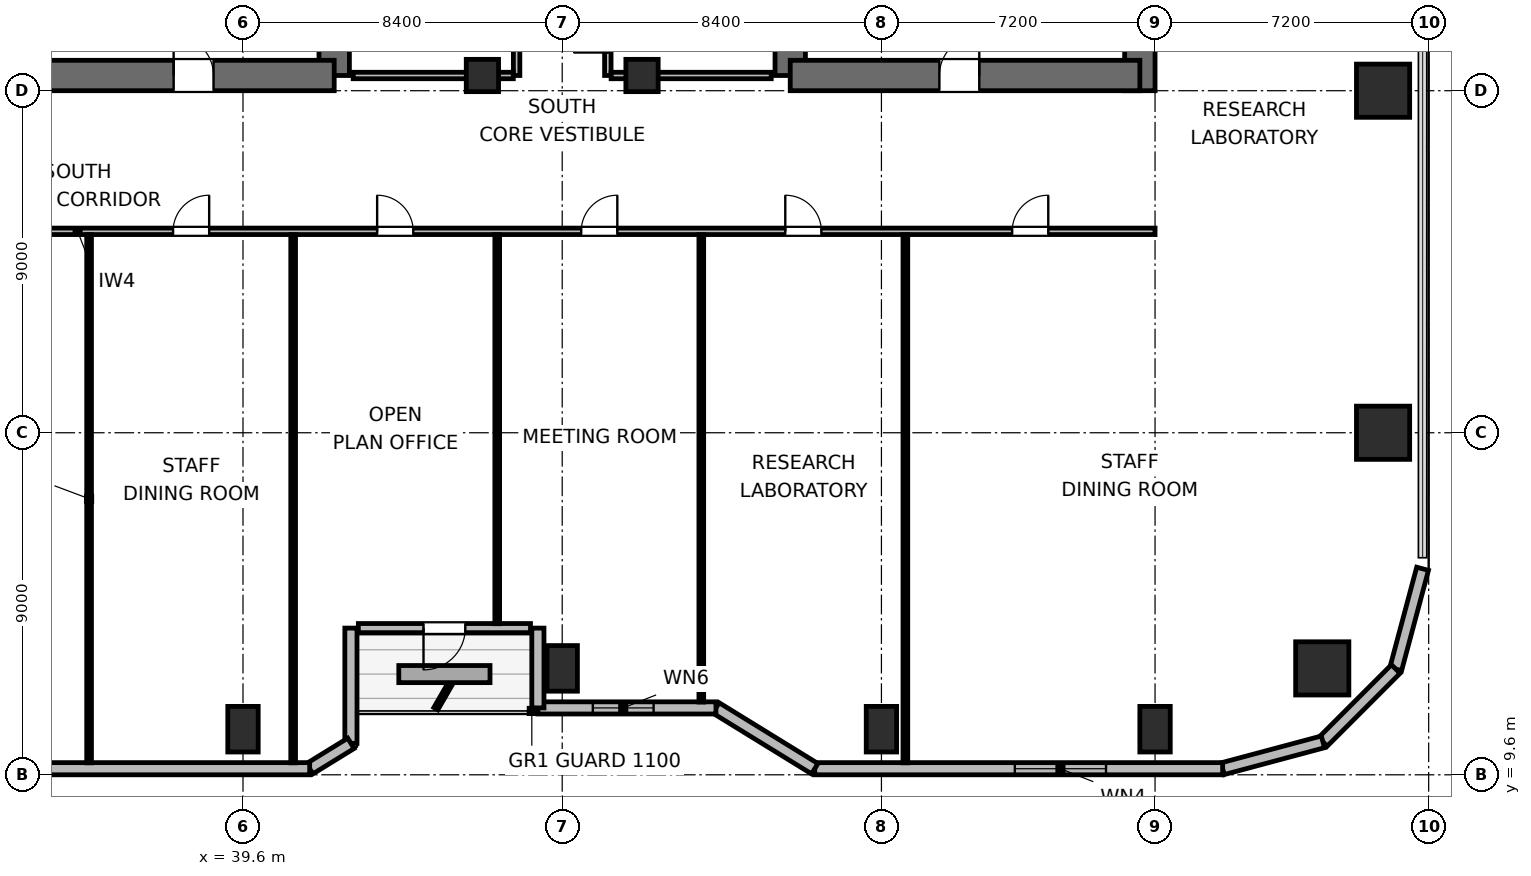
"""IFC4 building model, lengths in metres.
Left out: names, types, materials, properties, quantities, classifications, styles, units other than length and angle.
Written with IfcOpenShell. Run it as: python <this file> out.ifc"""

import sys

from ifc_helpers import new_model, si_unit, direction, frame, frame_2d, origin, origin_2d, place, context, subcontext, project, spatial, rectangle, circle, extrude, element, fill, save


model = new_model("IFC4")
c1 = context("Model", 3, precision=1e-05, world=origin(), true_north=direction((0.0, 1.0)))
c2 = subcontext(c1, "Body", "Model", "MODEL_VIEW")
j1 = project(units=[si_unit("LENGTHUNIT", "METRE"), si_unit("PLANEANGLEUNIT", "RADIAN")], contexts=[c1])
p1 = place(None, origin())
s1 = spatial("IfcSite", under=j1, at=p1, CompositionType="ELEMENT")
p2 = place(p1, origin())
s2 = spatial("IfcBuilding", under=s1, at=p2, CompositionType="ELEMENT")
p3 = place(p2, frame((0.0, 0.0, 125.4)))
s3 = spatial("IfcBuildingStorey", under=s2, at=p3, CompositionType="ELEMENT", Elevation=125.4)
p4 = place(p3, frame((42.0, 28.0, 0.0), z_axis=(0.0, 0.0, 1.0), x_axis=(0.0, 1.0, 0.0)))
e1 = element("IfcWall", 1, at=p4, inside=s3, PredefinedType="SHEAR", context=c2, shape_type="SweptSolid", body=[
    extrude(rectangle(XDim=6.4, YDim=0.8, at=frame_2d((3.2, 0.0))), origin(), (0.0, 0.0, 1.0), 4.5),
])
p5 = place(p3, frame((32.8, 28.0, 0.0), z_axis=(0.0, 0.0, 1.0), x_axis=(1.0, 0.0, 0.0)))
e2 = element("IfcWall", 2, at=p5, inside=s3, PredefinedType="SHEAR", context=c2, shape_type="SweptSolid", body=[
    extrude(rectangle(XDim=9.2, YDim=0.8, at=frame_2d((4.6, 0.0))), origin(), (0.0, 0.0, 1.0), 4.5),
])
p6 = place(p5, frame((4.975, 0.0, 0.0)))
e3 = element("IfcOpeningElement", 3, at=p6, cuts=e2, PredefinedType="OPENING", context=c2, shape_type="SweptSolid", body=[
    extrude(rectangle(XDim=1.05, YDim=2.04, at=frame_2d((0.525, 1.02))), frame((0.0, 0.41, 0.0), z_axis=(0.0, -1.0, 0.0), x_axis=(1.0, 0.0, 0.0)), (0.0, 0.0, 1.0), 0.82),
])
p7 = place(p3, frame((54.0, 28.0, 0.0), z_axis=(0.0, 0.0, 1.0), x_axis=(0.0, 1.0, 0.0)))
e4 = element("IfcWall", 4, at=p7, inside=s3, PredefinedType="SHEAR", context=c2, shape_type="SweptSolid", body=[
    extrude(rectangle(XDim=7.8, YDim=0.8, at=frame_2d((3.9, 0.0))), origin(), (0.0, 0.0, 1.0), 4.5),
])
p8 = place(p3, frame((63.2, 27.6, 0.0), z_axis=(0.0, 0.0, 1.0), x_axis=(0.0, 1.0, 0.0)))
e5 = element("IfcWall", 5, at=p8, inside=s3, PredefinedType="SHEAR", context=c2, shape_type="SweptSolid", body=[
    extrude(rectangle(XDim=16.8, YDim=0.8, at=frame_2d((8.4, 0.0))), origin(), (0.0, 0.0, 1.0), 4.5),
])
p9 = place(p3, frame((54.0, 28.0, 0.0), z_axis=(0.0, 0.0, 1.0), x_axis=(1.0, 0.0, 0.0)))
e6 = element("IfcWall", 6, at=p9, inside=s3, PredefinedType="SHEAR", context=c2, shape_type="SweptSolid", body=[
    extrude(rectangle(XDim=9.2, YDim=0.8, at=frame_2d((4.6, 0.0))), origin(), (0.0, 0.0, 1.0), 4.5),
])
p10 = place(p9, frame((3.925, 0.0, 0.0)))
e7 = element("IfcOpeningElement", 7, at=p10, cuts=e6, PredefinedType="OPENING", context=c2, shape_type="SweptSolid", body=[
    extrude(rectangle(XDim=1.05, YDim=2.04, at=frame_2d((0.525, 1.02))), frame((0.0, 0.41, 0.0), z_axis=(0.0, -1.0, 0.0), x_axis=(1.0, 0.0, 0.0)), (0.0, 0.0, 1.0), 0.82),
])
p11 = place(p3, frame((68.0, 12.4, 0.0), z_axis=(0.0, 0.0, 1.0), x_axis=(1.0, 0.0, 0.0)))
e8 = element("IfcColumn", 8, at=p11, inside=s3, PredefinedType="COLUMN", context=c2, shape_type="SweptSolid", body=[
    extrude(circle(Radius=0.7, at=origin_2d()), origin(), (0.0, 0.0, 1.0), 4.5),
])
for number, where, z_axis, x_axis in (
    (9, (39.6, 10.8, 0.0), (0.0, 0.0, 1.0), (1.0, 0.0, 0.0)),
    (10, (48.0, 12.4, 0.0), (0.0, 0.0, 1.0), (1.0, 0.0, 0.0)),
    (11, (56.4, 10.8, 0.0), (0.0, 0.0, 1.0), (1.0, 0.0, 0.0)),
    (12, (63.6, 10.8, 0.0), (0.0, 0.0, 1.0), (1.0, 0.0, 0.0)),
):
    element("IfcColumn", number, at=place(p3, frame(where, z_axis=z_axis, x_axis=x_axis)), inside=s3, PredefinedType="COLUMN", context=c2, shape_type="SweptSolid", body=[
        extrude(rectangle(XDim=0.8, YDim=1.2, at=origin_2d()), origin(), (0.0, 0.0, 1.0), 4.5),
    ])
for number, where, z_axis, x_axis in (
    (13, (69.6, 18.6, 0.0), (0.0, 0.0, 1.0), (1.0, 0.0, 0.0)),
    (14, (69.6, 27.6, 0.0), (0.0, 0.0, 1.0), (1.0, 0.0, 0.0)),
):
    element("IfcColumn", number, at=place(p3, frame(where, z_axis=z_axis, x_axis=x_axis)), inside=s3, PredefinedType="COLUMN", context=c2, shape_type="SweptSolid", body=[
        extrude(rectangle(XDim=1.4, YDim=1.4, at=origin_2d()), origin(), (0.0, 0.0, 1.0), 4.5),
    ])
for number, where, z_axis, x_axis in (
    (15, (45.9, 28.0, 0.0), (0.0, 0.0, 1.0), (1.0, 0.0, 0.0)),
    (16, (50.1, 28.0, 0.0), (0.0, 0.0, 1.0), (1.0, 0.0, 0.0)),
):
    element("IfcColumn", number, at=place(p3, frame(where, z_axis=z_axis, x_axis=x_axis)), inside=s3, PredefinedType="COLUMN", context=c2, shape_type="SweptSolid", body=[
        extrude(rectangle(XDim=0.85, YDim=0.85, at=origin_2d()), origin(), (0.0, 0.0, 1.0), 4.5),
    ])
p12 = place(p3, frame((70.64, 15.021, 0.0), z_axis=(0.0, 0.0, 1.0), x_axis=(-0.258613949072, -0.965980758269, 0.0)))
e17 = element("IfcWall", 17, at=p12, inside=s3, PredefinedType="SOLIDWALL", context=c2, shape_type="SweptSolid", body=[
    extrude(rectangle(XDim=2.731, YDim=0.32, at=frame_2d((1.366, 0.0))), origin(), (0.0, 0.0, 1.0), 4.24),
])
p13 = place(p3, frame((69.934, 12.383, 0.0), z_axis=(0.0, 0.0, 1.0), x_axis=(-0.707151821269, -0.707061738235, 0.0)))
e18 = element("IfcWall", 18, at=p13, inside=s3, PredefinedType="SOLIDWALL", context=c2, shape_type="SweptSolid", body=[
    extrude(rectangle(XDim=2.71, YDim=0.32, at=frame_2d((1.355, 0.0))), origin(), (0.0, 0.0, 1.0), 4.24),
])
p14 = place(p3, frame((68.017, 10.467, 0.0), z_axis=(0.0, 0.0, 1.0), x_axis=(-0.965958423373, -0.25869736047, 0.0)))
e19 = element("IfcWall", 19, at=p14, inside=s3, PredefinedType="SOLIDWALL", context=c2, shape_type="SweptSolid", body=[
    extrude(rectangle(XDim=2.731, YDim=0.32, at=frame_2d((1.366, 0.0))), origin(), (0.0, 0.0, 1.0), 4.24),
])
p15 = place(p3, frame((65.379, 9.76, 0.0), z_axis=(0.0, 0.0, 1.0), x_axis=(-1.0, 0.0, 0.0)))
e20 = element("IfcWall", 20, at=p15, inside=s3, PredefinedType="SOLIDWALL", context=c2, shape_type="SweptSolid", body=[
    extrude(rectangle(XDim=10.734, YDim=0.32, at=frame_2d((5.367, 0.0))), origin(), (0.0, 0.0, 1.0), 4.24),
])
p16 = place(p15, frame((3.069, 0.0, 0.85)))
e21 = element("IfcOpeningElement", 21, at=p16, cuts=e20, PredefinedType="OPENING", context=c2, shape_type="SweptSolid", body=[
    extrude(rectangle(XDim=2.4, YDim=1.15, at=frame_2d((1.2, 0.575))), frame((0.0, 0.17, 0.0), z_axis=(0.0, -1.0, 0.0), x_axis=(1.0, 0.0, 0.0)), (0.0, 0.0, 1.0), 0.34),
])
p17 = place(p3, frame((54.645, 9.76, 0.0), z_axis=(0.0, 0.0, 1.0), x_axis=(-0.851630857047, 0.524142044989, 0.0)))
e22 = element("IfcWall", 22, at=p17, inside=s3, PredefinedType="SOLIDWALL", context=c2, shape_type="SweptSolid", body=[
    extrude(rectangle(XDim=3.053, YDim=0.32, at=frame_2d((1.526, 0.0))), origin(), (0.0, 0.0, 1.0), 3.475),
])
p18 = place(p3, frame((52.045, 11.36, 0.0), z_axis=(0.0, 0.0, 1.0), x_axis=(-1.0, 0.0, 0.0)))
e23 = element("IfcWall", 23, at=p18, inside=s3, PredefinedType="SOLIDWALL", context=c2, shape_type="SweptSolid", body=[
    extrude(rectangle(XDim=4.685, YDim=0.32, at=frame_2d((2.343, 0.0))), origin(), (0.0, 0.0, 1.0), 3.475),
])
p19 = place(p18, frame((1.64, 0.0, 0.85)))
e24 = element("IfcOpeningElement", 24, at=p19, cuts=e23, PredefinedType="OPENING", context=c2, shape_type="SweptSolid", body=[
    extrude(rectangle(XDim=1.6, YDim=1.0, at=frame_2d((0.8, 0.5))), frame((0.0, 0.17, 0.0), z_axis=(0.0, -1.0, 0.0), x_axis=(1.0, 0.0, 0.0)), (0.0, 0.0, 1.0), 0.34),
])
p20 = place(p3, frame((47.36, 11.36, 0.0), z_axis=(0.0, 0.0, 1.0), x_axis=(0.0, 1.0, 0.0)))
e25 = element("IfcWall", 25, at=p20, inside=s3, PredefinedType="SOLIDWALL", context=c2, shape_type="SweptSolid", body=[
    extrude(rectangle(XDim=2.1, YDim=0.32, at=frame_2d((1.05, 0.0))), origin(), (0.0, 0.0, 1.0), 3.475),
])
p21 = place(p3, frame((47.165, 13.46, 0.0), z_axis=(0.0, 0.0, 1.0), x_axis=(-1.0, 0.0, 0.0)))
e26 = element("IfcWall", 26, at=p21, inside=s3, PredefinedType="SOLIDWALL", context=c2, shape_type="SweptSolid", body=[
    extrude(rectangle(XDim=4.53, YDim=0.24, at=frame_2d((2.265, 0.0))), origin(), (0.0, 0.0, 1.0), 4.24),
])
p22 = place(p21, frame((1.715, 0.0, 0.0)))
e27 = element("IfcOpeningElement", 27, at=p22, cuts=e26, PredefinedType="OPENING", context=c2, shape_type="SweptSolid", body=[
    extrude(rectangle(XDim=1.1, YDim=2.04, at=frame_2d((0.55, 1.02))), frame((0.0, 0.13, 0.0), z_axis=(0.0, -1.0, 0.0), x_axis=(1.0, 0.0, 0.0)), (0.0, 0.0, 1.0), 0.26),
])
p23 = place(p3, frame((42.44, 13.46, 0.0), z_axis=(0.0, 0.0, 1.0), x_axis=(0.0, -1.0, 0.0)))
e28 = element("IfcWall", 28, at=p23, inside=s3, PredefinedType="SOLIDWALL", context=c2, shape_type="SweptSolid", body=[
    extrude(rectangle(XDim=3.032, YDim=0.32, at=frame_2d((1.516, 0.0))), origin(), (0.0, 0.0, 1.0), 3.475),
])
p24 = place(p3, frame((42.44, 10.427, 0.0), z_axis=(0.0, 0.0, 1.0), x_axis=(-0.851776724646, -0.523904964045, 0.0)))
e29 = element("IfcWall", 29, at=p24, inside=s3, PredefinedType="SOLIDWALL", context=c2, shape_type="SweptSolid", body=[
    extrude(rectangle(XDim=1.274, YDim=0.32, at=frame_2d((0.637, 0.0))), origin(), (0.0, 0.0, 1.0), 4.24),
])
p25 = place(p3, frame((41.355, 9.76, 0.0), z_axis=(0.0, 0.0, 1.0), x_axis=(-1.0, 0.0, 0.0)))
e30 = element("IfcWall", 30, at=p25, inside=s3, PredefinedType="SOLIDWALL", context=c2, shape_type="SweptSolid", body=[
    extrude(rectangle(XDim=17.934, YDim=0.32, at=frame_2d((8.967, 0.0))), origin(), (0.0, 0.0, 1.0), 4.24),
])
p26 = place(p3, frame((46.8, 28.0, 0.0), z_axis=(0.0, 0.0, 1.0), x_axis=(0.0, 1.0, 0.0)))
e31 = element("IfcWall", 31, at=p26, inside=s3, PredefinedType="PARTITIONING", context=c2, shape_type="SweptSolid", body=[
    extrude(rectangle(XDim=4.5, YDim=0.17, at=frame_2d((2.25, 0.0))), origin(), (0.0, 0.0, 1.0), 4.24),
])
p27 = place(p26, frame((1.8, 0.0, 0.0)))
e32 = element("IfcOpeningElement", 32, at=p27, cuts=e31, PredefinedType="OPENING", context=c2, shape_type="SweptSolid", body=[
    extrude(rectangle(XDim=0.9, YDim=2.02, at=frame_2d((0.45, 1.01))), frame((0.0, 0.095, 0.0), z_axis=(0.0, -1.0, 0.0), x_axis=(1.0, 0.0, 0.0)), (0.0, 0.0, 1.0), 0.19),
])
p28 = place(p3, frame((42.5, 28.0, 0.0), z_axis=(0.0, 0.0, 1.0), x_axis=(1.0, 0.0, 0.0)))
e33 = element("IfcWall", 33, at=p28, inside=s3, PredefinedType="PARTITIONING", context=c2, shape_type="SweptSolid", body=[
    extrude(rectangle(XDim=4.213, YDim=0.17, at=frame_2d((2.106, 0.0))), origin(), (0.0, 0.0, 1.0), 3.125),
])
p29 = place(p3, frame((49.2, 28.0, 0.0), z_axis=(0.0, 0.0, 1.0), x_axis=(0.0, 1.0, 0.0)))
e34 = element("IfcWall", 34, at=p29, inside=s3, PredefinedType="PARTITIONING", context=c2, shape_type="SweptSolid", body=[
    extrude(rectangle(XDim=4.5, YDim=0.17, at=frame_2d((2.25, 0.0))), origin(), (0.0, 0.0, 1.0), 4.24),
])
p30 = place(p29, frame((0.605, 0.0, 0.0)))
e35 = element("IfcOpeningElement", 35, at=p30, cuts=e34, PredefinedType="OPENING", context=c2, shape_type="SweptSolid", body=[
    extrude(rectangle(XDim=0.9, YDim=2.02, at=frame_2d((0.45, 1.01))), frame((0.0, 0.095, 0.0), z_axis=(0.0, -1.0, 0.0), x_axis=(1.0, 0.0, 0.0)), (0.0, 0.0, 1.0), 0.19),
])
p31 = place(p29, frame((2.655, 0.0, 0.0)))
e36 = element("IfcOpeningElement", 36, at=p31, cuts=e34, PredefinedType="OPENING", context=c2, shape_type="SweptSolid", body=[
    extrude(rectangle(XDim=0.9, YDim=2.02, at=frame_2d((0.45, 1.01))), frame((0.0, 0.095, 0.0), z_axis=(0.0, -1.0, 0.0), x_axis=(1.0, 0.0, 0.0)), (0.0, 0.0, 1.0), 0.19),
])
p32 = place(p3, frame((49.287, 28.0, 0.0), z_axis=(0.0, 0.0, 1.0), x_axis=(1.0, 0.0, 0.0)))
e37 = element("IfcWall", 37, at=p32, inside=s3, PredefinedType="PARTITIONING", context=c2, shape_type="SweptSolid", body=[
    extrude(rectangle(XDim=4.213, YDim=0.17, at=frame_2d((2.106, 0.0))), origin(), (0.0, 0.0, 1.0), 3.125),
])
p33 = place(p3, frame((28.975, 23.9, 0.0), z_axis=(0.0, 0.0, 1.0), x_axis=(1.0, 0.0, 0.0)))
e38 = element("IfcWall", 38, at=p33, inside=s3, PredefinedType="PARTITIONING", context=c2, shape_type="SweptSolid", body=[
    extrude(rectangle(XDim=34.625, YDim=0.17, at=frame_2d((17.312, 0.0))), origin(), (0.0, 0.0, 1.0), 4.24),
])
p34 = place(p33, frame((2.813, 0.0, 0.0)))
e39 = element("IfcOpeningElement", 39, at=p34, cuts=e38, PredefinedType="OPENING", context=c2, shape_type="SweptSolid", body=[
    extrude(rectangle(XDim=0.95, YDim=2.04, at=frame_2d((0.475, 1.02))), frame((0.0, 0.095, 0.0), z_axis=(0.0, -1.0, 0.0), x_axis=(1.0, 0.0, 0.0)), (0.0, 0.0, 1.0), 0.19),
])
p35 = place(p33, frame((8.785, 0.0, 0.0)))
e40 = element("IfcOpeningElement", 40, at=p35, cuts=e38, PredefinedType="OPENING", context=c2, shape_type="SweptSolid", body=[
    extrude(rectangle(XDim=0.95, YDim=2.04, at=frame_2d((0.475, 1.02))), frame((0.0, 0.095, 0.0), z_axis=(0.0, -1.0, 0.0), x_axis=(1.0, 0.0, 0.0)), (0.0, 0.0, 1.0), 0.19),
])
p36 = place(p33, frame((14.155, 0.0, 0.0)))
e41 = element("IfcOpeningElement", 41, at=p36, cuts=e38, PredefinedType="OPENING", context=c2, shape_type="SweptSolid", body=[
    extrude(rectangle(XDim=0.95, YDim=2.04, at=frame_2d((0.475, 1.02))), frame((0.0, 0.095, 0.0), z_axis=(0.0, -1.0, 0.0), x_axis=(1.0, 0.0, 0.0)), (0.0, 0.0, 1.0), 0.19),
])
p37 = place(p33, frame((19.525, 0.0, 0.0)))
e42 = element("IfcOpeningElement", 42, at=p37, cuts=e38, PredefinedType="OPENING", context=c2, shape_type="SweptSolid", body=[
    extrude(rectangle(XDim=0.95, YDim=2.04, at=frame_2d((0.475, 1.02))), frame((0.0, 0.095, 0.0), z_axis=(0.0, -1.0, 0.0), x_axis=(1.0, 0.0, 0.0)), (0.0, 0.0, 1.0), 0.19),
])
p38 = place(p33, frame((24.895, 0.0, 0.0)))
e43 = element("IfcOpeningElement", 43, at=p38, cuts=e38, PredefinedType="OPENING", context=c2, shape_type="SweptSolid", body=[
    extrude(rectangle(XDim=0.95, YDim=2.04, at=frame_2d((0.475, 1.02))), frame((0.0, 0.095, 0.0), z_axis=(0.0, -1.0, 0.0), x_axis=(1.0, 0.0, 0.0)), (0.0, 0.0, 1.0), 0.19),
])
p39 = place(p33, frame((30.865, 0.0, 0.0)))
e44 = element("IfcOpeningElement", 44, at=p39, cuts=e38, PredefinedType="OPENING", context=c2, shape_type="SweptSolid", body=[
    extrude(rectangle(XDim=0.95, YDim=2.04, at=frame_2d((0.475, 1.02))), frame((0.0, 0.095, 0.0), z_axis=(0.0, -1.0, 0.0), x_axis=(1.0, 0.0, 0.0)), (0.0, 0.0, 1.0), 0.19),
])
p40 = place(p3, frame((35.55, 9.915, 0.0), z_axis=(0.0, 0.0, 1.0), x_axis=(0.0, 1.0, 0.0)))
e45 = element("IfcWall", 45, at=p40, inside=s3, PredefinedType="PARTITIONING", context=c2, shape_type="SweptSolid", body=[
    extrude(rectangle(XDim=13.898, YDim=0.125, at=frame_2d((6.949, 0.0))), origin(), (0.0, 0.0, 1.0), 4.24),
])
p41 = place(p3, frame((40.92, 9.915, 0.0), z_axis=(0.0, 0.0, 1.0), x_axis=(0.0, 1.0, 0.0)))
e46 = element("IfcWall", 46, at=p41, inside=s3, PredefinedType="PARTITIONING", context=c2, shape_type="SweptSolid", body=[
    extrude(rectangle(XDim=13.898, YDim=0.125, at=frame_2d((6.949, 0.0))), origin(), (0.0, 0.0, 1.0), 3.603),
])
p42 = place(p3, frame((46.29, 13.575, 0.0), z_axis=(0.0, 0.0, 1.0), x_axis=(0.0, 1.0, 0.0)))
e47 = element("IfcWall", 47, at=p42, inside=s3, PredefinedType="PARTITIONING", context=c2, shape_type="SweptSolid", body=[
    extrude(rectangle(XDim=10.238, YDim=0.125, at=frame_2d((5.119, 0.0))), origin(), (0.0, 0.0, 1.0), 4.24),
])
p43 = place(p3, frame((51.66, 11.515, 0.0), z_axis=(0.0, 0.0, 1.0), x_axis=(0.0, 1.0, 0.0)))
e48 = element("IfcWall", 48, at=p43, inside=s3, PredefinedType="PARTITIONING", context=c2, shape_type="SweptSolid", body=[
    extrude(rectangle(XDim=12.298, YDim=0.125, at=frame_2d((6.149, 0.0))), origin(), (0.0, 0.0, 1.0), 3.603),
])
p44 = place(p3, frame((57.03, 9.915, 0.0), z_axis=(0.0, 0.0, 1.0), x_axis=(0.0, 1.0, 0.0)))
e49 = element("IfcWall", 49, at=p44, inside=s3, PredefinedType="PARTITIONING", context=c2, shape_type="SweptSolid", body=[
    extrude(rectangle(XDim=13.898, YDim=0.125, at=frame_2d((6.949, 0.0))), origin(), (0.0, 0.0, 1.0), 4.24),
])
p45 = place(p16, origin())
e50 = element("IfcWindow", 50, at=p45, inside=s3, PartitioningType="SINGLE_PANEL", PredefinedType="WINDOW", context=c2, shape_type="SweptSolid", body=[
    extrude(rectangle(XDim=2.4, YDim=1.15, at=frame_2d((1.2, 0.575))), frame((0.0, 0.03, 0.0), z_axis=(0.0, -1.0, 0.0), x_axis=(1.0, 0.0, 0.0)), (0.0, 0.0, 1.0), 0.06),
])
fill(e21, e50)
p46 = place(p19, origin())
e51 = element("IfcWindow", 51, at=p46, inside=s3, PartitioningType="SINGLE_PANEL", PredefinedType="WINDOW", context=c2, shape_type="SweptSolid", body=[
    extrude(rectangle(XDim=1.6, YDim=1.0, at=frame_2d((0.8, 0.5))), frame((0.0, 0.03, 0.0), z_axis=(0.0, -1.0, 0.0), x_axis=(1.0, 0.0, 0.0)), (0.0, 0.0, 1.0), 0.06),
])
fill(e24, e51)
p47 = place(p22, origin())
e52 = element("IfcDoor", 52, at=p47, inside=s3, OperationType="SINGLE_SWING_RIGHT", PredefinedType="DOOR", context=c2, shape_type="SweptSolid", body=[
    extrude(rectangle(XDim=1.1, YDim=2.04, at=frame_2d((0.55, 1.02))), frame((0.0, 0.025, 0.0), z_axis=(0.0, -1.0, 0.0), x_axis=(1.0, 0.0, 0.0)), (0.0, 0.0, 1.0), 0.05),
])
fill(e27, e52)
p48 = place(p6, origin())
e53 = element("IfcDoor", 53, at=p48, inside=s3, OperationType="SINGLE_SWING_LEFT", PredefinedType="DOOR", context=c2, shape_type="SweptSolid", body=[
    extrude(rectangle(XDim=1.05, YDim=2.04, at=frame_2d((0.525, 1.02))), frame((0.0, 0.025, 0.0), z_axis=(0.0, -1.0, 0.0), x_axis=(1.0, 0.0, 0.0)), (0.0, 0.0, 1.0), 0.05),
])
fill(e3, e53)
p49 = place(p10, origin())
e54 = element("IfcDoor", 54, at=p49, inside=s3, OperationType="SINGLE_SWING_RIGHT", PredefinedType="DOOR", context=c2, shape_type="SweptSolid", body=[
    extrude(rectangle(XDim=1.05, YDim=2.04, at=frame_2d((0.525, 1.02))), frame((0.0, 0.025, 0.0), z_axis=(0.0, -1.0, 0.0), x_axis=(1.0, 0.0, 0.0)), (0.0, 0.0, 1.0), 0.05),
])
fill(e7, e54)
p50 = place(p35, origin())
e55 = element("IfcDoor", 55, at=p50, inside=s3, OperationType="SINGLE_SWING_RIGHT", PredefinedType="DOOR", context=c2, shape_type="SweptSolid", body=[
    extrude(rectangle(XDim=0.95, YDim=2.04, at=frame_2d((0.475, 1.02))), frame((0.0, 0.025, 0.0), z_axis=(0.0, -1.0, 0.0), x_axis=(1.0, 0.0, 0.0)), (0.0, 0.0, 1.0), 0.05),
])
fill(e40, e55)
p51 = place(p36, origin())
e56 = element("IfcDoor", 56, at=p51, inside=s3, OperationType="SINGLE_SWING_LEFT", PredefinedType="DOOR", context=c2, shape_type="SweptSolid", body=[
    extrude(rectangle(XDim=0.95, YDim=2.04, at=frame_2d((0.475, 1.02))), frame((0.0, 0.025, 0.0), z_axis=(0.0, -1.0, 0.0), x_axis=(1.0, 0.0, 0.0)), (0.0, 0.0, 1.0), 0.05),
])
fill(e41, e56)
p52 = place(p37, origin())
e57 = element("IfcDoor", 57, at=p52, inside=s3, OperationType="SINGLE_SWING_RIGHT", PredefinedType="DOOR", context=c2, shape_type="SweptSolid", body=[
    extrude(rectangle(XDim=0.95, YDim=2.04, at=frame_2d((0.475, 1.02))), frame((0.0, 0.025, 0.0), z_axis=(0.0, -1.0, 0.0), x_axis=(1.0, 0.0, 0.0)), (0.0, 0.0, 1.0), 0.05),
])
fill(e42, e57)
p53 = place(p38, origin())
e58 = element("IfcDoor", 58, at=p53, inside=s3, OperationType="SINGLE_SWING_LEFT", PredefinedType="DOOR", context=c2, shape_type="SweptSolid", body=[
    extrude(rectangle(XDim=0.95, YDim=2.04, at=frame_2d((0.475, 1.02))), frame((0.0, 0.025, 0.0), z_axis=(0.0, -1.0, 0.0), x_axis=(1.0, 0.0, 0.0)), (0.0, 0.0, 1.0), 0.05),
])
fill(e43, e58)
p54 = place(p39, origin())
e59 = element("IfcDoor", 59, at=p54, inside=s3, OperationType="SINGLE_SWING_RIGHT", PredefinedType="DOOR", context=c2, shape_type="SweptSolid", body=[
    extrude(rectangle(XDim=0.95, YDim=2.04, at=frame_2d((0.475, 1.02))), frame((0.0, 0.025, 0.0), z_axis=(0.0, -1.0, 0.0), x_axis=(1.0, 0.0, 0.0)), (0.0, 0.0, 1.0), 0.05),
])
fill(e44, e59)
save(model, sys.argv[1])
